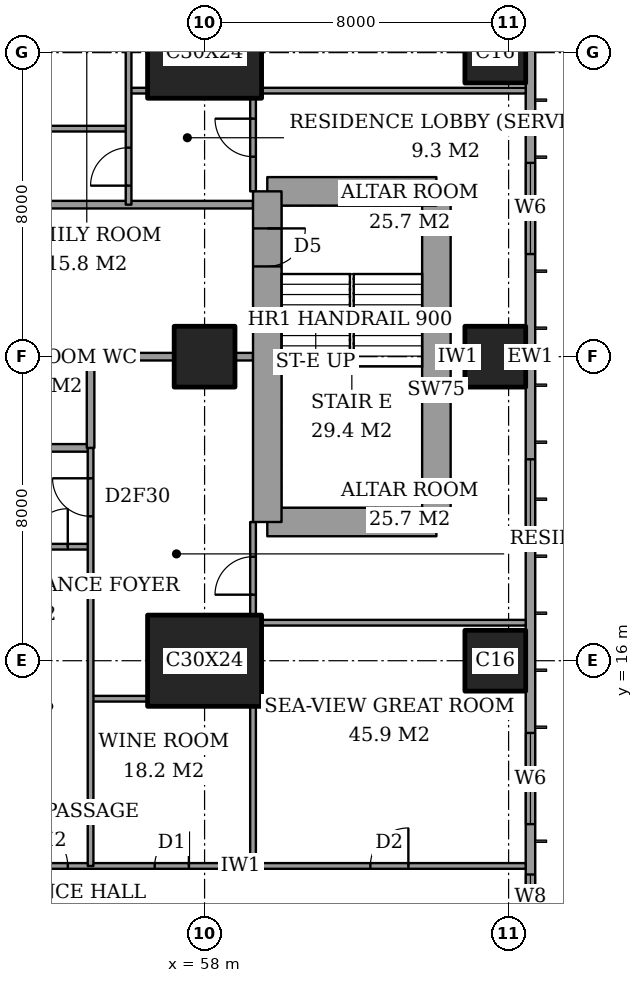
"""IFC4 building model, lengths in metres.
Left out: names, types, materials, properties, quantities, classifications, styles, units other than length and angle.
Written with IfcOpenShell. Run it as: python <this file> out.ifc"""

import sys

from ifc_helpers import new_model, si_unit, direction, frame, frame_2d, origin, origin_2d, place, context, subcontext, project, spatial, rectangle, extrude, element, fill, save


model = new_model("IFC4")
c1 = context("Model", 3, precision=1e-05, world=origin(), true_north=direction((0.0, 1.0)))
c2 = subcontext(c1, "Body", "Model", "MODEL_VIEW")
j1 = project(units=[si_unit("LENGTHUNIT", "METRE"), si_unit("PLANEANGLEUNIT", "RADIAN")], contexts=[c1])
p1 = place(None, origin())
s1 = spatial("IfcSite", under=j1, at=p1, CompositionType="ELEMENT")
p2 = place(p1, origin())
s2 = spatial("IfcBuilding", under=s1, at=p2, CompositionType="ELEMENT")
p3 = place(p2, frame((0.0, 0.0, 244.8)))
s3 = spatial("IfcBuildingStorey", under=s2, at=p3, CompositionType="ELEMENT", Elevation=244.8)
p4 = place(p3, frame((58.0, 16.0, 0.0), z_axis=(0.0, 0.0, 1.0), x_axis=(1.0, 0.0, 0.0)))
e1 = element("IfcColumn", 1, at=p4, inside=s3, PredefinedType="COLUMN", context=c2, shape_type="SweptSolid", body=[
    extrude(rectangle(XDim=3.0, YDim=2.4, at=origin_2d()), origin(), (0.0, 0.0, 1.0), 3.6),
])
p5 = place(p3, frame((58.0, 24.0, 0.0), z_axis=(0.0, 0.0, 1.0), x_axis=(1.0, 0.0, 0.0)))
e2 = element("IfcColumn", 2, at=p5, inside=s3, PredefinedType="COLUMN", context=c2, shape_type="SweptSolid", body=[
    extrude(rectangle(XDim=1.6, YDim=1.6, at=origin_2d()), origin(), (0.0, 0.0, 1.0), 3.6),
])
p6 = place(p3, frame((58.0, 32.0, 0.0), z_axis=(0.0, 0.0, 1.0), x_axis=(1.0, 0.0, 0.0)))
e3 = element("IfcColumn", 3, at=p6, inside=s3, PredefinedType="COLUMN", context=c2, shape_type="SweptSolid", body=[
    extrude(rectangle(XDim=3.0, YDim=2.4, at=origin_2d()), origin(), (0.0, 0.0, 1.0), 3.6),
])
for number, where, z_axis, x_axis in (
    (4, (65.65, 16.0, 0.0), (0.0, 0.0, 1.0), (1.0, 0.0, 0.0)),
    (5, (65.65, 24.0, 0.0), (0.0, 0.0, 1.0), (1.0, 0.0, 0.0)),
    (6, (65.65, 32.0, 0.0), (0.0, 0.0, 1.0), (1.0, 0.0, 0.0)),
):
    element("IfcColumn", number, at=place(p3, frame(where, z_axis=z_axis, x_axis=x_axis)), inside=s3, PredefinedType="COLUMN", context=c2, shape_type="SweptSolid", body=[
        extrude(rectangle(XDim=1.6, YDim=1.6, at=origin_2d()), origin(), (0.0, 0.0, 1.0), 3.6),
    ])
p7 = place(p3, frame((59.65, 19.65, 0.0), z_axis=(0.0, 0.0, 1.0), x_axis=(1.0, 0.0, 0.0)))
e7 = element("IfcWall", 7, at=p7, inside=s3, PredefinedType="SHEAR", context=c2, shape_type="SweptSolid", body=[
    extrude(rectangle(XDim=4.45, YDim=0.75, at=frame_2d((2.225, 0.0))), origin(), (0.0, 0.0, 1.0), 3.6),
])
p8 = place(p3, frame((64.1, 19.65, 0.0), z_axis=(0.0, 0.0, 1.0), x_axis=(0.0, 1.0, 0.0)))
e8 = element("IfcWall", 8, at=p8, inside=s3, PredefinedType="SHEAR", context=c2, shape_type="SweptSolid", body=[
    extrude(rectangle(XDim=8.7, YDim=0.75, at=frame_2d((4.35, 0.0))), origin(), (0.0, 0.0, 1.0), 3.6),
])
p9 = place(p3, frame((64.1, 28.35, 0.0), z_axis=(0.0, 0.0, 1.0), x_axis=(-1.0, 0.0, 0.0)))
e9 = element("IfcWall", 9, at=p9, inside=s3, PredefinedType="SHEAR", context=c2, shape_type="SweptSolid", body=[
    extrude(rectangle(XDim=4.45, YDim=0.75, at=frame_2d((2.225, 0.0))), origin(), (0.0, 0.0, 1.0), 3.6),
])
p10 = place(p3, frame((59.65, 28.35, 0.0), z_axis=(0.0, 0.0, 1.0), x_axis=(0.0, -1.0, 0.0)))
e10 = element("IfcWall", 10, at=p10, inside=s3, PredefinedType="SHEAR", context=c2, shape_type="SweptSolid", body=[
    extrude(rectangle(XDim=8.7, YDim=0.75, at=frame_2d((4.35, 0.0))), origin(), (0.0, 0.0, 1.0), 3.6),
])
p11 = place(p10, frame((0.975, 0.0, 0.0)))
e11 = element("IfcOpeningElement", 11, at=p11, cuts=e10, PredefinedType="OPENING", context=c2, shape_type="SweptSolid", body=[
    extrude(rectangle(XDim=1.0, YDim=2.1, at=frame_2d((0.5, 1.05))), frame((0.0, 0.385, 0.0), z_axis=(0.0, -1.0, 0.0), x_axis=(1.0, 0.0, 0.0)), (0.0, 0.0, 1.0), 0.77),
])
p12 = place(p3, frame((66.575, 3.175, 0.0), z_axis=(0.0, 0.0, 1.0), x_axis=(0.0, 1.0, 0.0)))
e12 = element("IfcWall", 12, at=p12, inside=s3, PredefinedType="SOLIDWALL", context=c2, shape_type="SweptSolid", body=[
    extrude(rectangle(XDim=41.65, YDim=0.25, at=frame_2d((20.825, 0.0))), origin(), (0.0, 0.0, 1.0), 3.6),
])
p13 = place(p12, frame((0.875, 0.0, 0.6)))
e13 = element("IfcOpeningElement", 13, at=p13, cuts=e12, PredefinedType="OPENING", context=c2, shape_type="SweptSolid", body=[
    extrude(rectangle(XDim=2.4, YDim=2.0, at=frame_2d((1.2, 1.0))), frame((0.0, 0.135, 0.0), z_axis=(0.0, -1.0, 0.0), x_axis=(1.0, 0.0, 0.0)), (0.0, 0.0, 1.0), 0.27),
])
p14 = place(p12, frame((6.0, 0.0, 0.6)))
e14 = element("IfcOpeningElement", 14, at=p14, cuts=e12, PredefinedType="OPENING", context=c2, shape_type="SweptSolid", body=[
    extrude(rectangle(XDim=1.2, YDim=2.0, at=frame_2d((0.6, 1.0))), frame((0.0, 0.135, 0.0), z_axis=(0.0, -1.0, 0.0), x_axis=(1.0, 0.0, 0.0)), (0.0, 0.0, 1.0), 0.27),
])
p15 = place(p12, frame((8.525, 0.0, 0.6)))
e15 = element("IfcOpeningElement", 15, at=p15, cuts=e12, PredefinedType="OPENING", context=c2, shape_type="SweptSolid", body=[
    extrude(rectangle(XDim=2.4, YDim=2.0, at=frame_2d((1.2, 1.0))), frame((0.0, 0.135, 0.0), z_axis=(0.0, -1.0, 0.0), x_axis=(1.0, 0.0, 0.0)), (0.0, 0.0, 1.0), 0.27),
])
p16 = place(p12, frame((15.725, 0.0, 0.6)))
e16 = element("IfcOpeningElement", 16, at=p16, cuts=e12, PredefinedType="OPENING", context=c2, shape_type="SweptSolid", body=[
    extrude(rectangle(XDim=2.4, YDim=2.0, at=frame_2d((1.2, 1.0))), frame((0.0, 0.135, 0.0), z_axis=(0.0, -1.0, 0.0), x_axis=(1.0, 0.0, 0.0)), (0.0, 0.0, 1.0), 0.27),
])
p17 = place(p12, frame((23.525, 0.0, 0.6)))
e17 = element("IfcOpeningElement", 17, at=p17, cuts=e12, PredefinedType="OPENING", context=c2, shape_type="SweptSolid", body=[
    extrude(rectangle(XDim=2.4, YDim=2.0, at=frame_2d((1.2, 1.0))), frame((0.0, 0.135, 0.0), z_axis=(0.0, -1.0, 0.0), x_axis=(1.0, 0.0, 0.0)), (0.0, 0.0, 1.0), 0.27),
])
p18 = place(p12, frame((30.625, 0.0, 0.6)))
e18 = element("IfcOpeningElement", 18, at=p18, cuts=e12, PredefinedType="OPENING", context=c2, shape_type="SweptSolid", body=[
    extrude(rectangle(XDim=2.4, YDim=2.0, at=frame_2d((1.2, 1.0))), frame((0.0, 0.135, 0.0), z_axis=(0.0, -1.0, 0.0), x_axis=(1.0, 0.0, 0.0)), (0.0, 0.0, 1.0), 0.27),
])
p19 = place(p12, frame((34.325, 0.0, 0.6)))
e19 = element("IfcOpeningElement", 19, at=p19, cuts=e12, PredefinedType="OPENING", context=c2, shape_type="SweptSolid", body=[
    extrude(rectangle(XDim=1.2, YDim=2.0, at=frame_2d((0.6, 1.0))), frame((0.0, 0.135, 0.0), z_axis=(0.0, -1.0, 0.0), x_axis=(1.0, 0.0, 0.0)), (0.0, 0.0, 1.0), 0.27),
])
p20 = place(p12, frame((38.375, 0.0, 0.6)))
e20 = element("IfcOpeningElement", 20, at=p20, cuts=e12, PredefinedType="OPENING", context=c2, shape_type="SweptSolid", body=[
    extrude(rectangle(XDim=2.4, YDim=2.0, at=frame_2d((1.2, 1.0))), frame((0.0, 0.135, 0.0), z_axis=(0.0, -1.0, 0.0), x_axis=(1.0, 0.0, 0.0)), (0.0, 0.0, 1.0), 0.27),
])
p21 = place(p3, frame((41.439, 10.6, 0.0), z_axis=(0.0, 0.0, 1.0), x_axis=(1.0, 0.0, 0.0)))
e21 = element("IfcWall", 21, at=p21, inside=s3, PredefinedType="PARTITIONING", context=c2, shape_type="SweptSolid", body=[
    extrude(rectangle(XDim=25.011, YDim=0.15, at=frame_2d((12.505, 0.0))), origin(), (0.0, 0.0, 1.0), 3.35),
])
p22 = place(p21, frame((11.961, 0.0, 0.0)))
e22 = element("IfcOpeningElement", 22, at=p22, cuts=e21, PredefinedType="OPENING", context=c2, shape_type="SweptSolid", body=[
    extrude(rectangle(XDim=1.0, YDim=2.1, at=frame_2d((0.5, 1.05))), frame((0.0, 0.085, 0.0), z_axis=(0.0, -1.0, 0.0), x_axis=(1.0, 0.0, 0.0)), (0.0, 0.0, 1.0), 0.17),
])
p23 = place(p21, frame((20.924, 0.0, 0.0)))
e23 = element("IfcOpeningElement", 23, at=p23, cuts=e21, PredefinedType="OPENING", context=c2, shape_type="SweptSolid", body=[
    extrude(rectangle(XDim=1.0, YDim=2.1, at=frame_2d((0.5, 1.05))), frame((0.0, 0.085, 0.0), z_axis=(0.0, -1.0, 0.0), x_axis=(1.0, 0.0, 0.0)), (0.0, 0.0, 1.0), 0.17),
])
p24 = place(p21, frame((15.249, 0.0, 0.0)))
e24 = element("IfcOpeningElement", 24, at=p24, cuts=e21, PredefinedType="OPENING", context=c2, shape_type="SweptSolid", body=[
    extrude(rectangle(XDim=0.9, YDim=2.1, at=frame_2d((0.45, 1.05))), frame((0.0, 0.085, 0.0), z_axis=(0.0, -1.0, 0.0), x_axis=(1.0, 0.0, 0.0)), (0.0, 0.0, 1.0), 0.17),
])
p25 = place(p21, frame((9.661, 0.0, 0.0)))
e25 = element("IfcOpeningElement", 25, at=p25, cuts=e21, PredefinedType="OPENING", context=c2, shape_type="SweptSolid", body=[
    extrude(rectangle(XDim=1.0, YDim=2.1, at=frame_2d((0.5, 1.05))), frame((0.0, 0.085, 0.0), z_axis=(0.0, -1.0, 0.0), x_axis=(1.0, 0.0, 0.0)), (0.0, 0.0, 1.0), 0.17),
])
p26 = place(p21, frame((7.311, 0.0, 0.0)))
e26 = element("IfcOpeningElement", 26, at=p26, cuts=e21, PredefinedType="OPENING", context=c2, shape_type="SweptSolid", body=[
    extrude(rectangle(XDim=0.9, YDim=2.1, at=frame_2d((0.45, 1.05))), frame((0.0, 0.085, 0.0), z_axis=(0.0, -1.0, 0.0), x_axis=(1.0, 0.0, 0.0)), (0.0, 0.0, 1.0), 0.17),
])
p27 = place(p21, frame((2.836, 0.0, 0.0)))
e27 = element("IfcOpeningElement", 27, at=p27, cuts=e21, PredefinedType="OPENING", context=c2, shape_type="SweptSolid", body=[
    extrude(rectangle(XDim=1.0, YDim=2.1, at=frame_2d((0.5, 1.05))), frame((0.0, 0.085, 0.0), z_axis=(0.0, -1.0, 0.0), x_axis=(1.0, 0.0, 0.0)), (0.0, 0.0, 1.0), 0.17),
])
p28 = place(p3, frame((55.0, 15.0, 0.0), z_axis=(0.0, 0.0, 1.0), x_axis=(1.0, 0.0, 0.0)))
e28 = element("IfcWall", 28, at=p28, inside=s3, PredefinedType="PARTITIONING", context=c2, shape_type="SweptSolid", body=[
    extrude(rectangle(XDim=1.5, YDim=0.15, at=frame_2d((0.75, 0.0))), origin(), (0.0, 0.0, 1.0), 3.35),
])
p29 = place(p3, frame((59.5, 17.0, 0.0), z_axis=(0.0, 0.0, 1.0), x_axis=(1.0, 0.0, 0.0)))
e29 = element("IfcWall", 29, at=p29, inside=s3, PredefinedType="PARTITIONING", context=c2, shape_type="SweptSolid", body=[
    extrude(rectangle(XDim=6.95, YDim=0.15, at=frame_2d((3.475, 0.0))), origin(), (0.0, 0.0, 1.0), 3.35),
])
p30 = place(p3, frame((51.6, 19.0, 0.0), z_axis=(0.0, 0.0, 1.0), x_axis=(1.0, 0.0, 0.0)))
e30 = element("IfcWall", 30, at=p30, inside=s3, PredefinedType="PARTITIONING", context=c2, shape_type="SweptSolid", body=[
    extrude(rectangle(XDim=3.4, YDim=0.15, at=frame_2d((1.7, 0.0))), origin(), (0.0, 0.0, 1.0), 3.35),
])
p31 = place(p30, frame((1.8, 0.0, 0.0)))
e31 = element("IfcOpeningElement", 31, at=p31, cuts=e30, PredefinedType="OPENING", context=c2, shape_type="SweptSolid", body=[
    extrude(rectangle(XDim=1.0, YDim=2.1, at=frame_2d((0.5, 1.05))), frame((0.0, 0.085, 0.0), z_axis=(0.0, -1.0, 0.0), x_axis=(1.0, 0.0, 0.0)), (0.0, 0.0, 1.0), 0.17),
])
p32 = place(p3, frame((51.2, 21.6, 0.0), z_axis=(0.0, 0.0, 1.0), x_axis=(1.0, 0.0, 0.0)))
e32 = element("IfcWall", 32, at=p32, inside=s3, PredefinedType="PARTITIONING", context=c2, shape_type="SweptSolid", body=[
    extrude(rectangle(XDim=3.8, YDim=0.2, at=frame_2d((1.9, 0.0))), origin(), (0.0, 0.0, 1.0), 3.35),
])
p33 = place(p32, frame((1.45, 0.0, 0.0)))
e33 = element("IfcOpeningElement", 33, at=p33, cuts=e32, PredefinedType="OPENING", context=c2, shape_type="SweptSolid", body=[
    extrude(rectangle(XDim=0.9, YDim=2.1, at=frame_2d((0.45, 1.05))), frame((0.0, 0.11, 0.0), z_axis=(0.0, -1.0, 0.0), x_axis=(1.0, 0.0, 0.0)), (0.0, 0.0, 1.0), 0.22),
])
p34 = place(p3, frame((50.8, 24.0, 0.0), z_axis=(0.0, 0.0, 1.0), x_axis=(1.0, 0.0, 0.0)))
e34 = element("IfcWall", 34, at=p34, inside=s3, PredefinedType="PARTITIONING", context=c2, shape_type="SweptSolid", body=[
    extrude(rectangle(XDim=6.4, YDim=0.2, at=frame_2d((3.2, 0.0))), origin(), (0.0, 0.0, 1.0), 3.35),
])
p35 = place(p3, frame((58.8, 24.0, 0.0), z_axis=(0.0, 0.0, 1.0), x_axis=(1.0, 0.0, 0.0)))
e35 = element("IfcWall", 35, at=p35, inside=s3, PredefinedType="PARTITIONING", context=c2, shape_type="SweptSolid", body=[
    extrude(rectangle(XDim=0.475, YDim=0.2, at=frame_2d((0.237, 0.0))), origin(), (0.0, 0.0, 1.0), 3.35),
])
p36 = place(p3, frame((64.475, 24.0, 0.0), z_axis=(0.0, 0.0, 1.0), x_axis=(1.0, 0.0, 0.0)))
e36 = element("IfcWall", 36, at=p36, inside=s3, PredefinedType="PARTITIONING", context=c2, shape_type="SweptSolid", body=[
    extrude(rectangle(XDim=0.375, YDim=0.15, at=frame_2d((0.188, 0.0))), origin(), (0.0, 0.0, 1.0), 3.35),
])
p37 = place(p3, frame((42.0, 28.0, 0.0), z_axis=(0.0, 0.0, 1.0), x_axis=(1.0, 0.0, 0.0)))
e37 = element("IfcWall", 37, at=p37, inside=s3, PredefinedType="PARTITIONING", context=c2, shape_type="SweptSolid", body=[
    extrude(rectangle(XDim=17.275, YDim=0.2, at=frame_2d((8.637, 0.0))), origin(), (0.0, 0.0, 1.0), 3.35),
])
p38 = place(p37, frame((9.4, 0.0, 0.0)))
e38 = element("IfcOpeningElement", 38, at=p38, cuts=e37, PredefinedType="OPENING", context=c2, shape_type="SweptSolid", body=[
    extrude(rectangle(XDim=1.2, YDim=2.4, at=frame_2d((0.6, 1.2))), frame((0.0, 0.11, 0.0), z_axis=(0.0, -1.0, 0.0), x_axis=(1.0, 0.0, 0.0)), (0.0, 0.0, 1.0), 0.22),
])
p39 = place(p3, frame((51.6, 30.0, 0.0), z_axis=(0.0, 0.0, 1.0), x_axis=(1.0, 0.0, 0.0)))
e39 = element("IfcWall", 39, at=p39, inside=s3, PredefinedType="PARTITIONING", context=c2, shape_type="SweptSolid", body=[
    extrude(rectangle(XDim=4.4, YDim=0.15, at=frame_2d((2.2, 0.0))), origin(), (0.0, 0.0, 1.0), 3.35),
])
p40 = place(p39, frame((0.6, 0.0, 0.0)))
e40 = element("IfcOpeningElement", 40, at=p40, cuts=e39, PredefinedType="OPENING", context=c2, shape_type="SweptSolid", body=[
    extrude(rectangle(XDim=1.0, YDim=2.1, at=frame_2d((0.5, 1.05))), frame((0.0, 0.085, 0.0), z_axis=(0.0, -1.0, 0.0), x_axis=(1.0, 0.0, 0.0)), (0.0, 0.0, 1.0), 0.17),
])
p41 = place(p3, frame((56.0, 31.0, 0.0), z_axis=(0.0, 0.0, 1.0), x_axis=(1.0, 0.0, 0.0)))
e41 = element("IfcWall", 41, at=p41, inside=s3, PredefinedType="PARTITIONING", context=c2, shape_type="SweptSolid", body=[
    extrude(rectangle(XDim=0.5, YDim=0.15, at=frame_2d((0.25, 0.0))), origin(), (0.0, 0.0, 1.0), 3.35),
])
p42 = place(p3, frame((59.5, 31.0, 0.0), z_axis=(0.0, 0.0, 1.0), x_axis=(1.0, 0.0, 0.0)))
e42 = element("IfcWall", 42, at=p42, inside=s3, PredefinedType="PARTITIONING", context=c2, shape_type="SweptSolid", body=[
    extrude(rectangle(XDim=6.95, YDim=0.15, at=frame_2d((3.475, 0.0))), origin(), (0.0, 0.0, 1.0), 3.35),
])
p43 = place(p3, frame((55.0, 21.6, 0.0), z_axis=(0.0, 0.0, 1.0), x_axis=(0.0, 1.0, 0.0)))
e43 = element("IfcWall", 43, at=p43, inside=s3, PredefinedType="PARTITIONING", context=c2, shape_type="SweptSolid", body=[
    extrude(rectangle(XDim=2.4, YDim=0.2, at=frame_2d((1.2, 0.0))), origin(), (0.0, 0.0, 1.0), 3.35),
])
p44 = place(p3, frame((55.0, 10.6, 0.0), z_axis=(0.0, 0.0, 1.0), x_axis=(0.0, 1.0, 0.0)))
e44 = element("IfcWall", 44, at=p44, inside=s3, PredefinedType="PARTITIONING", context=c2, shape_type="SweptSolid", body=[
    extrude(rectangle(XDim=11.0, YDim=0.15, at=frame_2d((5.5, 0.0))), origin(), (0.0, 0.0, 1.0), 3.35),
])
p45 = place(p44, frame((9.2, 0.0, 0.0)))
e45 = element("IfcOpeningElement", 45, at=p45, cuts=e44, PredefinedType="OPENING", context=c2, shape_type="SweptSolid", body=[
    extrude(rectangle(XDim=1.0, YDim=2.1, at=frame_2d((0.5, 1.05))), frame((0.0, 0.085, 0.0), z_axis=(0.0, -1.0, 0.0), x_axis=(1.0, 0.0, 0.0)), (0.0, 0.0, 1.0), 0.17),
])
p46 = place(p3, frame((56.0, 28.0, 0.0), z_axis=(0.0, 0.0, 1.0), x_axis=(0.0, 1.0, 0.0)))
e46 = element("IfcWall", 46, at=p46, inside=s3, PredefinedType="PARTITIONING", context=c2, shape_type="SweptSolid", body=[
    extrude(rectangle(XDim=9.2, YDim=0.15, at=frame_2d((4.6, 0.0))), origin(), (0.0, 0.0, 1.0), 3.35),
])
p47 = place(p46, frame((0.5, 0.0, 0.0)))
e47 = element("IfcOpeningElement", 47, at=p47, cuts=e46, PredefinedType="OPENING", context=c2, shape_type="SweptSolid", body=[
    extrude(rectangle(XDim=1.0, YDim=2.1, at=frame_2d((0.5, 1.05))), frame((0.0, 0.085, 0.0), z_axis=(0.0, -1.0, 0.0), x_axis=(1.0, 0.0, 0.0)), (0.0, 0.0, 1.0), 0.17),
])
p48 = place(p3, frame((59.275, 10.6, 0.0), z_axis=(0.0, 0.0, 1.0), x_axis=(0.0, 1.0, 0.0)))
e48 = element("IfcWall", 48, at=p48, inside=s3, PredefinedType="PARTITIONING", context=c2, shape_type="SweptSolid", body=[
    extrude(rectangle(XDim=4.2, YDim=0.15, at=frame_2d((2.1, 0.0))), origin(), (0.0, 0.0, 1.0), 3.35),
])
p49 = place(p3, frame((59.275, 17.2, 0.0), z_axis=(0.0, 0.0, 1.0), x_axis=(0.0, 1.0, 0.0)))
e49 = element("IfcWall", 49, at=p49, inside=s3, PredefinedType="PARTITIONING", context=c2, shape_type="SweptSolid", body=[
    extrude(rectangle(XDim=2.45, YDim=0.15, at=frame_2d((1.225, 0.0))), origin(), (0.0, 0.0, 1.0), 3.35),
])
p50 = place(p49, frame((0.538, 0.0, 0.0)))
e50 = element("IfcOpeningElement", 50, at=p50, cuts=e49, PredefinedType="OPENING", context=c2, shape_type="SweptSolid", body=[
    extrude(rectangle(XDim=1.0, YDim=2.1, at=frame_2d((0.5, 1.05))), frame((0.0, 0.085, 0.0), z_axis=(0.0, -1.0, 0.0), x_axis=(1.0, 0.0, 0.0)), (0.0, 0.0, 1.0), 0.17),
])
p51 = place(p3, frame((59.275, 28.35, 0.0), z_axis=(0.0, 0.0, 1.0), x_axis=(0.0, 1.0, 0.0)))
e51 = element("IfcWall", 51, at=p51, inside=s3, PredefinedType="PARTITIONING", context=c2, shape_type="SweptSolid", body=[
    extrude(rectangle(XDim=2.45, YDim=0.15, at=frame_2d((1.225, 0.0))), origin(), (0.0, 0.0, 1.0), 3.35),
])
p52 = place(p51, frame((0.913, 0.0, 0.0)))
e52 = element("IfcOpeningElement", 52, at=p52, cuts=e51, PredefinedType="OPENING", context=c2, shape_type="SweptSolid", body=[
    extrude(rectangle(XDim=1.0, YDim=2.1, at=frame_2d((0.5, 1.05))), frame((0.0, 0.085, 0.0), z_axis=(0.0, -1.0, 0.0), x_axis=(1.0, 0.0, 0.0)), (0.0, 0.0, 1.0), 0.17),
])
p53 = place(p14, origin())
e53 = element("IfcWindow", 53, at=p53, inside=s3, PartitioningType="SINGLE_PANEL", PredefinedType="WINDOW", context=c2, shape_type="SweptSolid", body=[
    extrude(rectangle(XDim=1.2, YDim=2.0, at=frame_2d((0.6, 1.0))), frame((0.0, 0.03, 0.0), z_axis=(0.0, -1.0, 0.0), x_axis=(1.0, 0.0, 0.0)), (0.0, 0.0, 1.0), 0.06),
])
fill(e14, e53)
p54 = place(p15, origin())
e54 = element("IfcWindow", 54, at=p54, inside=s3, PartitioningType="SINGLE_PANEL", PredefinedType="WINDOW", context=c2, shape_type="SweptSolid", body=[
    extrude(rectangle(XDim=2.4, YDim=2.0, at=frame_2d((1.2, 1.0))), frame((0.0, 0.03, 0.0), z_axis=(0.0, -1.0, 0.0), x_axis=(1.0, 0.0, 0.0)), (0.0, 0.0, 1.0), 0.06),
])
fill(e15, e54)
p55 = place(p16, origin())
e55 = element("IfcWindow", 55, at=p55, inside=s3, PartitioningType="SINGLE_PANEL", PredefinedType="WINDOW", context=c2, shape_type="SweptSolid", body=[
    extrude(rectangle(XDim=2.4, YDim=2.0, at=frame_2d((1.2, 1.0))), frame((0.0, 0.03, 0.0), z_axis=(0.0, -1.0, 0.0), x_axis=(1.0, 0.0, 0.0)), (0.0, 0.0, 1.0), 0.06),
])
fill(e16, e55)
p56 = place(p17, origin())
e56 = element("IfcWindow", 56, at=p56, inside=s3, PartitioningType="SINGLE_PANEL", PredefinedType="WINDOW", context=c2, shape_type="SweptSolid", body=[
    extrude(rectangle(XDim=2.4, YDim=2.0, at=frame_2d((1.2, 1.0))), frame((0.0, 0.03, 0.0), z_axis=(0.0, -1.0, 0.0), x_axis=(1.0, 0.0, 0.0)), (0.0, 0.0, 1.0), 0.06),
])
fill(e17, e56)
p57 = place(p22, origin())
e57 = element("IfcDoor", 57, at=p57, inside=s3, OperationType="SINGLE_SWING_RIGHT", PredefinedType="DOOR", context=c2, shape_type="SweptSolid", body=[
    extrude(rectangle(XDim=1.0, YDim=2.1, at=frame_2d((0.5, 1.05))), frame((0.0, 0.025, 0.0), z_axis=(0.0, -1.0, 0.0), x_axis=(1.0, 0.0, 0.0)), (0.0, 0.0, 1.0), 0.05),
])
fill(e22, e57)
p58 = place(p23, origin())
e58 = element("IfcDoor", 58, at=p58, inside=s3, OperationType="SINGLE_SWING_LEFT", PredefinedType="DOOR", context=c2, shape_type="SweptSolid", body=[
    extrude(rectangle(XDim=1.0, YDim=2.1, at=frame_2d((0.5, 1.05))), frame((0.0, 0.025, 0.0), z_axis=(0.0, -1.0, 0.0), x_axis=(1.0, 0.0, 0.0)), (0.0, 0.0, 1.0), 0.05),
])
fill(e23, e58)
p59 = place(p50, origin())
e59 = element("IfcDoor", 59, at=p59, inside=s3, OperationType="SINGLE_SWING_RIGHT", PredefinedType="DOOR", context=c2, shape_type="SweptSolid", body=[
    extrude(rectangle(XDim=1.0, YDim=2.1, at=frame_2d((0.5, 1.05))), frame((0.0, 0.025, 0.0), z_axis=(0.0, -1.0, 0.0), x_axis=(1.0, 0.0, 0.0)), (0.0, 0.0, 1.0), 0.05),
])
fill(e50, e59)
p60 = place(p24, origin())
e60 = element("IfcDoor", 60, at=p60, inside=s3, OperationType="SINGLE_SWING_LEFT", PredefinedType="DOOR", context=c2, shape_type="SweptSolid", body=[
    extrude(rectangle(XDim=0.9, YDim=2.1, at=frame_2d((0.45, 1.05))), frame((0.0, 0.025, 0.0), z_axis=(0.0, -1.0, 0.0), x_axis=(1.0, 0.0, 0.0)), (0.0, 0.0, 1.0), 0.05),
])
fill(e24, e60)
p61 = place(p45, origin())
e61 = element("IfcDoor", 61, at=p61, inside=s3, OperationType="SINGLE_SWING_LEFT", PredefinedType="DOOR", context=c2, shape_type="SweptSolid", body=[
    extrude(rectangle(XDim=1.0, YDim=2.1, at=frame_2d((0.5, 1.05))), frame((0.0, 0.025, 0.0), z_axis=(0.0, -1.0, 0.0), x_axis=(1.0, 0.0, 0.0)), (0.0, 0.0, 1.0), 0.05),
])
fill(e45, e61)
p62 = place(p31, origin())
e62 = element("IfcDoor", 62, at=p62, inside=s3, OperationType="SINGLE_SWING_LEFT", PredefinedType="DOOR", context=c2, shape_type="SweptSolid", body=[
    extrude(rectangle(XDim=1.0, YDim=2.1, at=frame_2d((0.5, 1.05))), frame((0.0, 0.025, 0.0), z_axis=(0.0, -1.0, 0.0), x_axis=(1.0, 0.0, 0.0)), (0.0, 0.0, 1.0), 0.05),
])
fill(e31, e62)
p63 = place(p52, origin())
e63 = element("IfcDoor", 63, at=p63, inside=s3, OperationType="SINGLE_SWING_LEFT", PredefinedType="DOOR", context=c2, shape_type="SweptSolid", body=[
    extrude(rectangle(XDim=1.0, YDim=2.1, at=frame_2d((0.5, 1.05))), frame((0.0, 0.025, 0.0), z_axis=(0.0, -1.0, 0.0), x_axis=(1.0, 0.0, 0.0)), (0.0, 0.0, 1.0), 0.05),
])
fill(e52, e63)
p64 = place(p47, origin())
e64 = element("IfcDoor", 64, at=p64, inside=s3, OperationType="SINGLE_SWING_RIGHT", PredefinedType="DOOR", context=c2, shape_type="SweptSolid", body=[
    extrude(rectangle(XDim=1.0, YDim=2.1, at=frame_2d((0.5, 1.05))), frame((0.0, 0.025, 0.0), z_axis=(0.0, -1.0, 0.0), x_axis=(1.0, 0.0, 0.0)), (0.0, 0.0, 1.0), 0.05),
])
fill(e47, e64)
p65 = place(p11, origin())
e65 = element("IfcDoor", 65, at=p65, inside=s3, OperationType="SINGLE_SWING_RIGHT", PredefinedType="DOOR", context=c2, shape_type="SweptSolid", body=[
    extrude(rectangle(XDim=1.0, YDim=2.1, at=frame_2d((0.5, 1.05))), frame((0.0, 0.025, 0.0), z_axis=(0.0, -1.0, 0.0), x_axis=(1.0, 0.0, 0.0)), (0.0, 0.0, 1.0), 0.05),
])
fill(e11, e65)
save(model, sys.argv[1])
